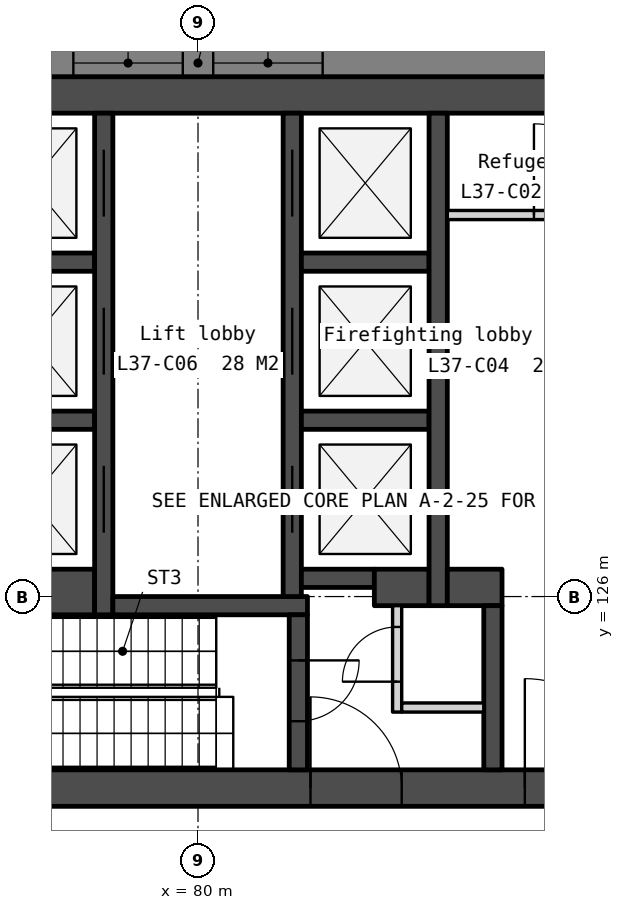
"""IFC4 building model, lengths in metres.
Left out: names, types, materials, properties, quantities, classifications, styles, units other than length and angle.
Written with IfcOpenShell. Run it as: python <this file> out.ifc"""

import sys

from ifc_helpers import new_model, si_unit, direction, frame, frame_2d, origin, place, context, subcontext, project, spatial, polyline, rectangle, outline, extrude, element, fill, save


model = new_model("IFC4")
c1 = context("Model", 3, precision=1e-05, world=origin(), true_north=direction((0.0, 1.0)))
c2 = subcontext(c1, "Body", "Model", "MODEL_VIEW")
j1 = project(units=[si_unit("LENGTHUNIT", "METRE"), si_unit("PLANEANGLEUNIT", "RADIAN")], contexts=[c1])
p1 = place(None, origin())
s1 = spatial("IfcSite", under=j1, at=p1, CompositionType="ELEMENT")
p2 = place(p1, origin())
s2 = spatial("IfcBuilding", under=s1, at=p2, CompositionType="ELEMENT")
p3 = place(p2, frame((0.0, 0.0, 148.1)))
s3 = spatial("IfcBuildingStorey", under=s2, at=p3, CompositionType="ELEMENT", Elevation=148.1)
p4 = place(p3, frame((69.0, 134.25, 0.0), z_axis=(0.0, 0.0, 1.0), x_axis=(1.0, 0.0, 0.0)))
e1 = element("IfcWall", 1, at=p4, inside=s3, PredefinedType="SOLIDWALL", context=c2, shape_type="SweptSolid", body=[
    extrude(rectangle(XDim=22.0, YDim=0.6, at=frame_2d((11.0, 0.0))), origin(), (0.0, 0.0, 1.0), 3.75),
])
p5 = place(p3, frame((69.0, 122.85, 0.0), z_axis=(0.0, 0.0, 1.0), x_axis=(1.0, 0.0, 0.0)))
e2 = element("IfcWall", 2, at=p5, inside=s3, PredefinedType="SOLIDWALL", context=c2, shape_type="SweptSolid", body=[
    extrude(rectangle(XDim=22.0, YDim=0.6, at=frame_2d((11.0, 0.0))), origin(), (0.0, 0.0, 1.0), 3.75),
])
p6 = place(p5, frame((16.375, 0.0, 0.0)))
e3 = element("IfcOpeningElement", 3, at=p6, cuts=e2, PredefinedType="OPENING", context=c2, shape_type="SweptSolid", body=[
    extrude(rectangle(XDim=1.8, YDim=2.1, at=frame_2d((0.9, 1.05))), frame((0.0, 0.31, 0.0), z_axis=(0.0, -1.0, 0.0), x_axis=(1.0, 0.0, 0.0)), (0.0, 0.0, 1.0), 0.62),
])
p7 = place(p5, frame((3.825, 0.0, 0.0)))
e4 = element("IfcOpeningElement", 4, at=p7, cuts=e2, PredefinedType="OPENING", context=c2, shape_type="SweptSolid", body=[
    extrude(rectangle(XDim=1.8, YDim=2.1, at=frame_2d((0.9, 1.05))), frame((0.0, 0.31, 0.0), z_axis=(0.0, -1.0, 0.0), x_axis=(1.0, 0.0, 0.0)), (0.0, 0.0, 1.0), 0.62),
])
p8 = place(p5, frame((12.85, 0.0, 0.0)))
e5 = element("IfcOpeningElement", 5, at=p8, cuts=e2, PredefinedType="OPENING", context=c2, shape_type="SweptSolid", body=[
    extrude(rectangle(XDim=1.5, YDim=2.1, at=frame_2d((0.75, 1.05))), frame((0.0, 0.31, 0.0), z_axis=(0.0, -1.0, 0.0), x_axis=(1.0, 0.0, 0.0)), (0.0, 0.0, 1.0), 0.62),
])
for number, where, z_axis, x_axis in (
    (6, (76.2, 131.5, 0.0), (0.0, 0.0, 1.0), (1.0, 0.0, 0.0)),
    (7, (76.2, 128.9, 0.0), (0.0, 0.0, 1.0), (1.0, 0.0, 0.0)),
):
    element("IfcWall", number, at=place(p3, frame(where, z_axis=z_axis, x_axis=x_axis)), inside=s3, PredefinedType="SOLIDWALL", context=c2, shape_type="SweptSolid", body=[
        extrude(rectangle(XDim=2.1, YDim=0.3, at=frame_2d((1.05, 0.0))), origin(), (0.0, 0.0, 1.0), 3.75),
    ])
p9 = place(p3, frame((76.2, 126.075, 0.0), z_axis=(0.0, 0.0, 1.0), x_axis=(1.0, 0.0, 0.0)))
e8 = element("IfcWall", 8, at=p9, inside=s3, PredefinedType="SOLIDWALL", context=c2, shape_type="SweptSolid", body=[
    extrude(rectangle(XDim=2.1, YDim=0.75, at=frame_2d((1.05, 0.0))), origin(), (0.0, 0.0, 1.0), 3.75),
])
p10 = place(p3, frame((78.45, 133.95, 0.0), z_axis=(0.0, 0.0, 1.0), x_axis=(0.0, -1.0, 0.0)))
e9 = element("IfcWall", 9, at=p10, inside=s3, PredefinedType="SOLIDWALL", context=c2, shape_type="SweptSolid", body=[
    extrude(rectangle(XDim=8.25, YDim=0.3, at=frame_2d((4.125, 0.0))), origin(), (0.0, 0.0, 1.0), 3.75),
])
p11 = place(p10, frame((0.6, 0.0, 0.0)))
e10 = element("IfcOpeningElement", 10, at=p11, cuts=e9, PredefinedType="OPENING", context=c2, shape_type="SweptSolid", body=[
    extrude(rectangle(XDim=1.1, YDim=2.1, at=frame_2d((0.55, 1.05))), frame((0.0, 0.16, 0.0), z_axis=(0.0, -1.0, 0.0), x_axis=(1.0, 0.0, 0.0)), (0.0, 0.0, 1.0), 0.32),
])
p12 = place(p10, frame((3.2, 0.0, 0.0)))
e11 = element("IfcOpeningElement", 11, at=p12, cuts=e9, PredefinedType="OPENING", context=c2, shape_type="SweptSolid", body=[
    extrude(rectangle(XDim=1.1, YDim=2.1, at=frame_2d((0.55, 1.05))), frame((0.0, 0.16, 0.0), z_axis=(0.0, -1.0, 0.0), x_axis=(1.0, 0.0, 0.0)), (0.0, 0.0, 1.0), 0.32),
])
p13 = place(p10, frame((5.8, 0.0, 0.0)))
e12 = element("IfcOpeningElement", 12, at=p13, cuts=e9, PredefinedType="OPENING", context=c2, shape_type="SweptSolid", body=[
    extrude(rectangle(XDim=1.1, YDim=2.1, at=frame_2d((0.55, 1.05))), frame((0.0, 0.16, 0.0), z_axis=(0.0, -1.0, 0.0), x_axis=(1.0, 0.0, 0.0)), (0.0, 0.0, 1.0), 0.32),
])
p14 = place(p3, frame((78.6, 125.85, 0.0), z_axis=(0.0, 0.0, 1.0), x_axis=(1.0, 0.0, 0.0)))
e13 = element("IfcWall", 13, at=p14, inside=s3, PredefinedType="SOLIDWALL", context=c2, shape_type="SweptSolid", body=[
    extrude(rectangle(XDim=3.2, YDim=0.3, at=frame_2d((1.6, 0.0))), origin(), (0.0, 0.0, 1.0), 3.75),
])
p15 = place(p3, frame((81.55, 133.95, 0.0), z_axis=(0.0, 0.0, 1.0), x_axis=(0.0, -1.0, 0.0)))
e14 = element("IfcWall", 14, at=p15, inside=s3, PredefinedType="SOLIDWALL", context=c2, shape_type="SweptSolid", body=[
    extrude(rectangle(XDim=7.95, YDim=0.3, at=frame_2d((3.975, 0.0))), origin(), (0.0, 0.0, 1.0), 3.75),
])
p16 = place(p15, frame((0.6, 0.0, 0.0)))
e15 = element("IfcOpeningElement", 15, at=p16, cuts=e14, PredefinedType="OPENING", context=c2, shape_type="SweptSolid", body=[
    extrude(rectangle(XDim=1.1, YDim=2.1, at=frame_2d((0.55, 1.05))), frame((0.0, 0.16, 0.0), z_axis=(0.0, -1.0, 0.0), x_axis=(1.0, 0.0, 0.0)), (0.0, 0.0, 1.0), 0.32),
])
p17 = place(p15, frame((3.2, 0.0, 0.0)))
e16 = element("IfcOpeningElement", 16, at=p17, cuts=e14, PredefinedType="OPENING", context=c2, shape_type="SweptSolid", body=[
    extrude(rectangle(XDim=1.1, YDim=2.1, at=frame_2d((0.55, 1.05))), frame((0.0, 0.16, 0.0), z_axis=(0.0, -1.0, 0.0), x_axis=(1.0, 0.0, 0.0)), (0.0, 0.0, 1.0), 0.32),
])
p18 = place(p15, frame((5.8, 0.0, 0.0)))
e17 = element("IfcOpeningElement", 17, at=p18, cuts=e14, PredefinedType="OPENING", context=c2, shape_type="SweptSolid", body=[
    extrude(rectangle(XDim=1.1, YDim=2.1, at=frame_2d((0.55, 1.05))), frame((0.0, 0.16, 0.0), z_axis=(0.0, -1.0, 0.0), x_axis=(1.0, 0.0, 0.0)), (0.0, 0.0, 1.0), 0.32),
])
p19 = place(p3, frame((81.65, 125.7, 0.0), z_axis=(0.0, 0.0, 1.0), x_axis=(0.0, -1.0, 0.0)))
e18 = element("IfcWall", 18, at=p19, inside=s3, PredefinedType="SOLIDWALL", context=c2, shape_type="SweptSolid", body=[
    extrude(rectangle(XDim=2.55, YDim=0.3, at=frame_2d((1.275, 0.0))), origin(), (0.0, 0.0, 1.0), 3.75),
])
p20 = place(p19, frame((0.75, 0.0, 0.0)))
e19 = element("IfcOpeningElement", 19, at=p20, cuts=e18, PredefinedType="OPENING", context=c2, shape_type="SweptSolid", body=[
    extrude(rectangle(XDim=1.0, YDim=2.1, at=frame_2d((0.5, 1.05))), frame((0.0, 0.16, 0.0), z_axis=(0.0, -1.0, 0.0), x_axis=(1.0, 0.0, 0.0)), (0.0, 0.0, 1.0), 0.32),
])
for number, where, z_axis, x_axis in (
    (20, (81.7, 131.5, 0.0), (0.0, 0.0, 1.0), (1.0, 0.0, 0.0)),
    (21, (81.7, 128.9, 0.0), (0.0, 0.0, 1.0), (1.0, 0.0, 0.0)),
):
    element("IfcWall", number, at=place(p3, frame(where, z_axis=z_axis, x_axis=x_axis)), inside=s3, PredefinedType="SOLIDWALL", context=c2, shape_type="SweptSolid", body=[
        extrude(rectangle(XDim=2.1, YDim=0.3, at=frame_2d((1.05, 0.0))), origin(), (0.0, 0.0, 1.0), 3.75),
    ])
p21 = place(p3, frame((81.7, 126.3, 0.0), z_axis=(0.0, 0.0, 1.0), x_axis=(1.0, 0.0, 0.0)))
e22 = element("IfcWall", 22, at=p21, inside=s3, PredefinedType="SOLIDWALL", context=c2, shape_type="SweptSolid", body=[
    extrude(rectangle(XDim=1.2, YDim=0.3, at=frame_2d((0.6, 0.0))), origin(), (0.0, 0.0, 1.0), 3.75),
])
p22 = place(p3, frame((82.9, 126.15, 0.0), z_axis=(0.0, 0.0, 1.0), x_axis=(1.0, 0.0, 0.0)))
e23 = element("IfcWall", 23, at=p22, inside=s3, PredefinedType="SOLIDWALL", context=c2, shape_type="SweptSolid", body=[
    extrude(rectangle(XDim=0.9, YDim=0.6, at=frame_2d((0.45, 0.0))), origin(), (0.0, 0.0, 1.0), 3.75),
])
p23 = place(p3, frame((83.275, 125.85, 0.0), z_axis=(0.0, 0.0, 1.0), x_axis=(0.0, -1.0, 0.0)))
e24 = element("IfcWall", 24, at=p23, inside=s3, PredefinedType="PARTITIONING", context=c2, shape_type="SweptSolid", body=[
    extrude(rectangle(XDim=1.75, YDim=0.15, at=frame_2d((0.875, 0.0))), origin(), (0.0, 0.0, 1.0), 3.75),
])
p24 = place(p23, frame((0.35, 0.0, 0.0)))
e25 = element("IfcOpeningElement", 25, at=p24, cuts=e24, PredefinedType="OPENING", context=c2, shape_type="SweptSolid", body=[
    extrude(rectangle(XDim=0.9, YDim=2.1, at=frame_2d((0.45, 1.05))), frame((0.0, 0.085, 0.0), z_axis=(0.0, -1.0, 0.0), x_axis=(1.0, 0.0, 0.0)), (0.0, 0.0, 1.0), 0.17),
])
p25 = place(p3, frame((83.35, 124.175, 0.0), z_axis=(0.0, 0.0, 1.0), x_axis=(1.0, 0.0, 0.0)))
e26 = element("IfcWall", 26, at=p25, inside=s3, PredefinedType="PARTITIONING", context=c2, shape_type="SweptSolid", body=[
    extrude(rectangle(XDim=1.35, YDim=0.15, at=frame_2d((0.675, 0.0))), origin(), (0.0, 0.0, 1.0), 3.75),
])
p26 = place(p3, frame((83.95, 133.95, 0.0), z_axis=(0.0, 0.0, 1.0), x_axis=(0.0, -1.0, 0.0)))
e27 = element("IfcWall", 27, at=p26, inside=s3, PredefinedType="SOLIDWALL", context=c2, shape_type="SweptSolid", body=[
    extrude(rectangle(XDim=8.1, YDim=0.3, at=frame_2d((4.05, 0.0))), origin(), (0.0, 0.0, 1.0), 3.75),
])
p27 = place(p3, frame((84.1, 132.275, 0.0), z_axis=(0.0, 0.0, 1.0), x_axis=(1.0, 0.0, 0.0)))
e28 = element("IfcWall", 28, at=p27, inside=s3, PredefinedType="PARTITIONING", context=c2, shape_type="SweptSolid", body=[
    extrude(rectangle(XDim=3.45, YDim=0.15, at=frame_2d((1.725, 0.0))), origin(), (0.0, 0.0, 1.0), 3.75),
])
p28 = place(p27, frame((1.425, 0.0, 0.0)))
e29 = element("IfcOpeningElement", 29, at=p28, cuts=e28, PredefinedType="OPENING", context=c2, shape_type="SweptSolid", body=[
    extrude(rectangle(XDim=1.5, YDim=2.1, at=frame_2d((0.75, 1.05))), frame((0.0, 0.085, 0.0), z_axis=(0.0, -1.0, 0.0), x_axis=(1.0, 0.0, 0.0)), (0.0, 0.0, 1.0), 0.17),
])
p29 = place(p3, frame((84.1, 126.15, 0.0), z_axis=(0.0, 0.0, 1.0), x_axis=(1.0, 0.0, 0.0)))
e30 = element("IfcWall", 30, at=p29, inside=s3, PredefinedType="SOLIDWALL", context=c2, shape_type="SweptSolid", body=[
    extrude(rectangle(XDim=0.9, YDim=0.6, at=frame_2d((0.45, 0.0))), origin(), (0.0, 0.0, 1.0), 3.75),
])
p30 = place(p3, frame((84.85, 125.85, 0.0), z_axis=(0.0, 0.0, 1.0), x_axis=(0.0, -1.0, 0.0)))
e31 = element("IfcWall", 31, at=p30, inside=s3, PredefinedType="SOLIDWALL", context=c2, shape_type="SweptSolid", body=[
    extrude(rectangle(XDim=2.7, YDim=0.3, at=frame_2d((1.35, 0.0))), origin(), (0.0, 0.0, 1.0), 3.75),
])
p31 = place(p3, frame((100.243, 134.775, -0.15), z_axis=(0.0, 0.0, 1.0), x_axis=(-1.0, 0.0, 0.0)))
e32 = element("IfcWall", 32, at=p31, inside=s3, PredefinedType="SOLIDWALL", context=c2, shape_type="SweptSolid", body=[
    extrude(outline(polyline([(40.486, 0.0), (40.486, 3.9), (0.0, 3.9), (0.0, 0.0), (40.486, 0.0)])), frame((0.0, 0.225, 0.0), z_axis=(0.0, -1.0, 0.0), x_axis=(1.0, 0.0, 0.0)), (0.0, 0.0, 1.0), 0.45),
])
p32 = place(p31, frame((0.837, 0.0, 0.95)))
e33 = element("IfcOpeningElement", 33, at=p32, cuts=e32, PredefinedType="OPENING", context=c2, shape_type="SweptSolid", body=[
    extrude(rectangle(XDim=1.2, YDim=2.2, at=frame_2d((0.6, 1.1))), frame((0.0, 0.235, 0.0), z_axis=(0.0, -1.0, 0.0), x_axis=(1.0, 0.0, 0.0)), (0.0, 0.0, 1.0), 0.47),
])
p33 = place(p31, frame((8.072, 0.0, 0.95)))
e34 = element("IfcOpeningElement", 34, at=p33, cuts=e32, PredefinedType="OPENING", context=c2, shape_type="SweptSolid", body=[
    extrude(rectangle(XDim=1.8, YDim=2.2, at=frame_2d((0.9, 1.1))), frame((0.0, 0.235, 0.0), z_axis=(0.0, -1.0, 0.0), x_axis=(1.0, 0.0, 0.0)), (0.0, 0.0, 1.0), 0.47),
])
p34 = place(p31, frame((10.372, 0.0, 0.95)))
e35 = element("IfcOpeningElement", 35, at=p34, cuts=e32, PredefinedType="OPENING", context=c2, shape_type="SweptSolid", body=[
    extrude(rectangle(XDim=1.8, YDim=2.2, at=frame_2d((0.9, 1.1))), frame((0.0, 0.235, 0.0), z_axis=(0.0, -1.0, 0.0), x_axis=(1.0, 0.0, 0.0)), (0.0, 0.0, 1.0), 0.47),
])
p35 = place(p31, frame((18.193, 0.0, 0.95)))
e36 = element("IfcOpeningElement", 36, at=p35, cuts=e32, PredefinedType="OPENING", context=c2, shape_type="SweptSolid", body=[
    extrude(rectangle(XDim=1.8, YDim=2.2, at=frame_2d((0.9, 1.1))), frame((0.0, 0.235, 0.0), z_axis=(0.0, -1.0, 0.0), x_axis=(1.0, 0.0, 0.0)), (0.0, 0.0, 1.0), 0.47),
])
p36 = place(p31, frame((20.493, 0.0, 0.95)))
e37 = element("IfcOpeningElement", 37, at=p36, cuts=e32, PredefinedType="OPENING", context=c2, shape_type="SweptSolid", body=[
    extrude(rectangle(XDim=1.8, YDim=2.2, at=frame_2d((0.9, 1.1))), frame((0.0, 0.235, 0.0), z_axis=(0.0, -1.0, 0.0), x_axis=(1.0, 0.0, 0.0)), (0.0, 0.0, 1.0), 0.47),
])
p37 = place(p31, frame((28.315, 0.0, 0.95)))
e38 = element("IfcOpeningElement", 38, at=p37, cuts=e32, PredefinedType="OPENING", context=c2, shape_type="SweptSolid", body=[
    extrude(rectangle(XDim=1.8, YDim=2.2, at=frame_2d((0.9, 1.1))), frame((0.0, 0.235, 0.0), z_axis=(0.0, -1.0, 0.0), x_axis=(1.0, 0.0, 0.0)), (0.0, 0.0, 1.0), 0.47),
])
p38 = place(p31, frame((30.615, 0.0, 0.95)))
e39 = element("IfcOpeningElement", 39, at=p38, cuts=e32, PredefinedType="OPENING", context=c2, shape_type="SweptSolid", body=[
    extrude(rectangle(XDim=1.8, YDim=2.2, at=frame_2d((0.9, 1.1))), frame((0.0, 0.235, 0.0), z_axis=(0.0, -1.0, 0.0), x_axis=(1.0, 0.0, 0.0)), (0.0, 0.0, 1.0), 0.47),
])
p39 = place(p31, frame((38.449, 0.0, 0.95)))
e40 = element("IfcOpeningElement", 40, at=p39, cuts=e32, PredefinedType="OPENING", context=c2, shape_type="SweptSolid", body=[
    extrude(rectangle(XDim=1.2, YDim=2.2, at=frame_2d((0.6, 1.1))), frame((0.0, 0.235, 0.0), z_axis=(0.0, -1.0, 0.0), x_axis=(1.0, 0.0, 0.0)), (0.0, 0.0, 1.0), 0.47),
])
p40 = place(p3, frame((82.105, 96.067, -0.15), z_axis=(0.0, 0.0, 1.0), x_axis=(0.499997369791, 0.866026922331, 0.0)))
e41 = element("IfcWall", 41, at=p40, inside=s3, PredefinedType="SOLIDWALL", context=c2, shape_type="SweptSolid", body=[
    extrude(outline(polyline([(40.486, 0.0), (40.486, 3.9), (0.0, 3.9), (0.0, 0.0), (40.486, 0.0)])), frame((0.0, 0.225, 0.0), z_axis=(0.0, -1.0, 0.0), x_axis=(1.0, 0.0, 0.0)), (0.0, 0.0, 1.0), 0.45),
])
p41 = place(p40, frame((0.837, 0.0, 0.95)))
e42 = element("IfcOpeningElement", 42, at=p41, cuts=e41, PredefinedType="OPENING", context=c2, shape_type="SweptSolid", body=[
    extrude(rectangle(XDim=1.2, YDim=2.2, at=frame_2d((0.6, 1.1))), frame((0.0, 0.235, 0.0), z_axis=(0.0, -1.0, 0.0), x_axis=(1.0, 0.0, 0.0)), (0.0, 0.0, 1.0), 0.47),
])
p42 = place(p40, frame((8.072, 0.0, 0.95)))
e43 = element("IfcOpeningElement", 43, at=p42, cuts=e41, PredefinedType="OPENING", context=c2, shape_type="SweptSolid", body=[
    extrude(rectangle(XDim=1.8, YDim=2.2, at=frame_2d((0.9, 1.1))), frame((0.0, 0.235, 0.0), z_axis=(0.0, -1.0, 0.0), x_axis=(1.0, 0.0, 0.0)), (0.0, 0.0, 1.0), 0.47),
])
p43 = place(p40, frame((10.372, 0.0, 0.95)))
e44 = element("IfcOpeningElement", 44, at=p43, cuts=e41, PredefinedType="OPENING", context=c2, shape_type="SweptSolid", body=[
    extrude(rectangle(XDim=1.8, YDim=2.2, at=frame_2d((0.9, 1.1))), frame((0.0, 0.235, 0.0), z_axis=(0.0, -1.0, 0.0), x_axis=(1.0, 0.0, 0.0)), (0.0, 0.0, 1.0), 0.47),
])
p44 = place(p40, frame((18.193, 0.0, 0.95)))
e45 = element("IfcOpeningElement", 45, at=p44, cuts=e41, PredefinedType="OPENING", context=c2, shape_type="SweptSolid", body=[
    extrude(rectangle(XDim=1.8, YDim=2.2, at=frame_2d((0.9, 1.1))), frame((0.0, 0.235, 0.0), z_axis=(0.0, -1.0, 0.0), x_axis=(1.0, 0.0, 0.0)), (0.0, 0.0, 1.0), 0.47),
])
p45 = place(p40, frame((20.493, 0.0, 0.95)))
e46 = element("IfcOpeningElement", 46, at=p45, cuts=e41, PredefinedType="OPENING", context=c2, shape_type="SweptSolid", body=[
    extrude(rectangle(XDim=1.8, YDim=2.2, at=frame_2d((0.9, 1.1))), frame((0.0, 0.235, 0.0), z_axis=(0.0, -1.0, 0.0), x_axis=(1.0, 0.0, 0.0)), (0.0, 0.0, 1.0), 0.47),
])
p46 = place(p40, frame((28.315, 0.0, 0.95)))
e47 = element("IfcOpeningElement", 47, at=p46, cuts=e41, PredefinedType="OPENING", context=c2, shape_type="SweptSolid", body=[
    extrude(rectangle(XDim=1.8, YDim=2.2, at=frame_2d((0.9, 1.1))), frame((0.0, 0.235, 0.0), z_axis=(0.0, -1.0, 0.0), x_axis=(1.0, 0.0, 0.0)), (0.0, 0.0, 1.0), 0.47),
])
p47 = place(p40, frame((30.615, 0.0, 0.95)))
e48 = element("IfcOpeningElement", 48, at=p47, cuts=e41, PredefinedType="OPENING", context=c2, shape_type="SweptSolid", body=[
    extrude(rectangle(XDim=1.8, YDim=2.2, at=frame_2d((0.9, 1.1))), frame((0.0, 0.235, 0.0), z_axis=(0.0, -1.0, 0.0), x_axis=(1.0, 0.0, 0.0)), (0.0, 0.0, 1.0), 0.47),
])
p48 = place(p40, frame((38.449, 0.0, 0.95)))
e49 = element("IfcOpeningElement", 49, at=p48, cuts=e41, PredefinedType="OPENING", context=c2, shape_type="SweptSolid", body=[
    extrude(rectangle(XDim=1.2, YDim=2.2, at=frame_2d((0.6, 1.1))), frame((0.0, 0.235, 0.0), z_axis=(0.0, -1.0, 0.0), x_axis=(1.0, 0.0, 0.0)), (0.0, 0.0, 1.0), 0.47),
])
p49 = place(p11, origin())
e50 = element("IfcDoor", 50, at=p49, inside=s3, OperationType="SLIDING_TO_RIGHT", PredefinedType="DOOR", context=c2, shape_type="SweptSolid", body=[
    extrude(rectangle(XDim=1.1, YDim=2.1, at=frame_2d((0.55, 1.05))), frame((0.0, 0.025, 0.0), z_axis=(0.0, -1.0, 0.0), x_axis=(1.0, 0.0, 0.0)), (0.0, 0.0, 1.0), 0.05),
])
fill(e10, e50)
p50 = place(p12, origin())
e51 = element("IfcDoor", 51, at=p50, inside=s3, OperationType="SLIDING_TO_RIGHT", PredefinedType="DOOR", context=c2, shape_type="SweptSolid", body=[
    extrude(rectangle(XDim=1.1, YDim=2.1, at=frame_2d((0.55, 1.05))), frame((0.0, 0.025, 0.0), z_axis=(0.0, -1.0, 0.0), x_axis=(1.0, 0.0, 0.0)), (0.0, 0.0, 1.0), 0.05),
])
fill(e11, e51)
p51 = place(p13, origin())
e52 = element("IfcDoor", 52, at=p51, inside=s3, OperationType="SLIDING_TO_RIGHT", PredefinedType="DOOR", context=c2, shape_type="SweptSolid", body=[
    extrude(rectangle(XDim=1.1, YDim=2.1, at=frame_2d((0.55, 1.05))), frame((0.0, 0.025, 0.0), z_axis=(0.0, -1.0, 0.0), x_axis=(1.0, 0.0, 0.0)), (0.0, 0.0, 1.0), 0.05),
])
fill(e12, e52)
p52 = place(p16, origin())
e53 = element("IfcDoor", 53, at=p52, inside=s3, OperationType="SLIDING_TO_LEFT", PredefinedType="DOOR", context=c2, shape_type="SweptSolid", body=[
    extrude(rectangle(XDim=1.1, YDim=2.1, at=frame_2d((0.55, 1.05))), frame((0.0, 0.025, 0.0), z_axis=(0.0, -1.0, 0.0), x_axis=(1.0, 0.0, 0.0)), (0.0, 0.0, 1.0), 0.05),
])
fill(e15, e53)
p53 = place(p17, origin())
e54 = element("IfcDoor", 54, at=p53, inside=s3, OperationType="SLIDING_TO_LEFT", PredefinedType="DOOR", context=c2, shape_type="SweptSolid", body=[
    extrude(rectangle(XDim=1.1, YDim=2.1, at=frame_2d((0.55, 1.05))), frame((0.0, 0.025, 0.0), z_axis=(0.0, -1.0, 0.0), x_axis=(1.0, 0.0, 0.0)), (0.0, 0.0, 1.0), 0.05),
])
fill(e16, e54)
p54 = place(p18, origin())
e55 = element("IfcDoor", 55, at=p54, inside=s3, OperationType="SLIDING_TO_LEFT", PredefinedType="DOOR", context=c2, shape_type="SweptSolid", body=[
    extrude(rectangle(XDim=1.1, YDim=2.1, at=frame_2d((0.55, 1.05))), frame((0.0, 0.025, 0.0), z_axis=(0.0, -1.0, 0.0), x_axis=(1.0, 0.0, 0.0)), (0.0, 0.0, 1.0), 0.05),
])
fill(e17, e55)
p55 = place(p6, origin())
e56 = element("IfcDoor", 56, at=p55, inside=s3, OperationType="DOUBLE_DOOR_DOUBLE_SWING", PredefinedType="DOOR", context=c2, shape_type="SweptSolid", body=[
    extrude(rectangle(XDim=1.8, YDim=2.1, at=frame_2d((0.9, 1.05))), frame((0.0, 0.025, 0.0), z_axis=(0.0, -1.0, 0.0), x_axis=(1.0, 0.0, 0.0)), (0.0, 0.0, 1.0), 0.05),
])
fill(e3, e56)
p56 = place(p8, origin())
e57 = element("IfcDoor", 57, at=p56, inside=s3, OperationType="DOUBLE_DOOR_DOUBLE_SWING", PredefinedType="DOOR", context=c2, shape_type="SweptSolid", body=[
    extrude(rectangle(XDim=1.5, YDim=2.1, at=frame_2d((0.75, 1.05))), frame((0.0, 0.025, 0.0), z_axis=(0.0, -1.0, 0.0), x_axis=(1.0, 0.0, 0.0)), (0.0, 0.0, 1.0), 0.05),
])
fill(e5, e57)
p57 = place(p24, origin())
e58 = element("IfcDoor", 58, at=p57, inside=s3, OperationType="SINGLE_SWING_RIGHT", PredefinedType="DOOR", context=c2, shape_type="SweptSolid", body=[
    extrude(rectangle(XDim=0.9, YDim=2.1, at=frame_2d((0.45, 1.05))), frame((0.0, 0.025, 0.0), z_axis=(0.0, -1.0, 0.0), x_axis=(1.0, 0.0, 0.0)), (0.0, 0.0, 1.0), 0.05),
])
fill(e25, e58)
p58 = place(p28, origin())
e59 = element("IfcDoor", 59, at=p58, inside=s3, OperationType="DOUBLE_DOOR_DOUBLE_SWING", PredefinedType="DOOR", context=c2, shape_type="SweptSolid", body=[
    extrude(rectangle(XDim=1.5, YDim=2.1, at=frame_2d((0.75, 1.05))), frame((0.0, 0.025, 0.0), z_axis=(0.0, -1.0, 0.0), x_axis=(1.0, 0.0, 0.0)), (0.0, 0.0, 1.0), 0.05),
])
fill(e29, e59)
p59 = place(p20, origin())
e60 = element("IfcDoor", 60, at=p59, inside=s3, OperationType="SINGLE_SWING_LEFT", PredefinedType="DOOR", context=c2, shape_type="SweptSolid", body=[
    extrude(rectangle(XDim=1.0, YDim=2.1, at=frame_2d((0.5, 1.05))), frame((0.0, 0.025, 0.0), z_axis=(0.0, -1.0, 0.0), x_axis=(1.0, 0.0, 0.0)), (0.0, 0.0, 1.0), 0.05),
])
fill(e19, e60)
p60 = place(p35, origin())
e61 = element("IfcWindow", 61, at=p60, inside=s3, PartitioningType="SINGLE_PANEL", PredefinedType="WINDOW", context=c2, shape_type="SweptSolid", body=[
    extrude(rectangle(XDim=1.8, YDim=2.2, at=frame_2d((0.9, 1.1))), frame((0.0, 0.03, 0.0), z_axis=(0.0, -1.0, 0.0), x_axis=(1.0, 0.0, 0.0)), (0.0, 0.0, 1.0), 0.06),
])
fill(e36, e61)
p61 = place(p36, origin())
e62 = element("IfcWindow", 62, at=p61, inside=s3, PartitioningType="SINGLE_PANEL", PredefinedType="WINDOW", context=c2, shape_type="SweptSolid", body=[
    extrude(rectangle(XDim=1.8, YDim=2.2, at=frame_2d((0.9, 1.1))), frame((0.0, 0.03, 0.0), z_axis=(0.0, -1.0, 0.0), x_axis=(1.0, 0.0, 0.0)), (0.0, 0.0, 1.0), 0.06),
])
fill(e37, e62)
save(model, sys.argv[1])
